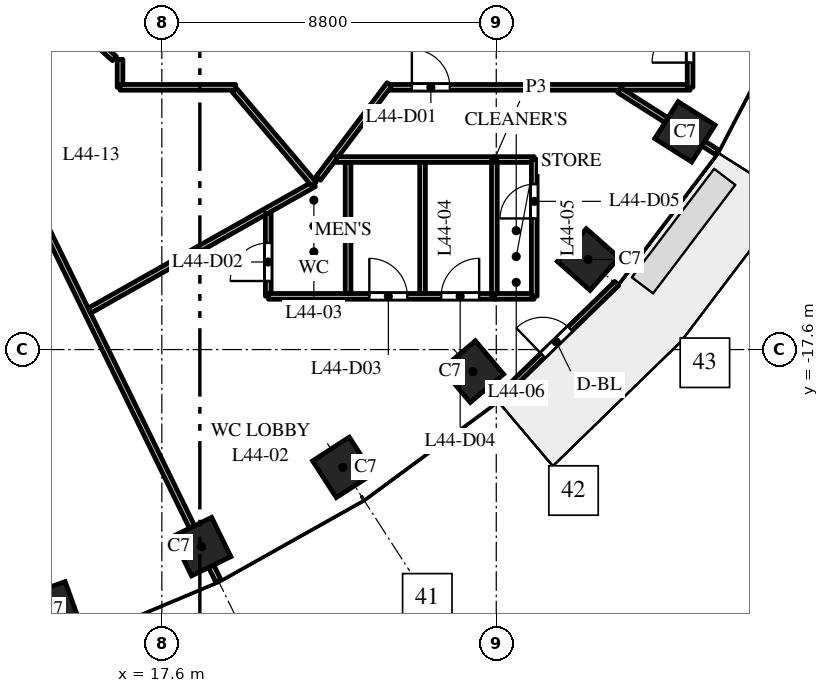
"""IFC4 building model, lengths in metres.
Left out: names, types, materials, properties, quantities, classifications, styles, units other than length and angle.
Written with IfcOpenShell. Run it as: python <this file> out.ifc"""

import sys

from ifc_helpers import new_model, si_unit, direction, frame, frame_2d, origin, origin_2d, place, context, subcontext, project, spatial, rectangle, extrude, element, fill, save


model = new_model("IFC4")
c1 = context("Model", 3, precision=1e-05, world=origin(), true_north=direction((0.0, 1.0)))
c2 = subcontext(c1, "Body", "Model", "MODEL_VIEW")
j1 = project(units=[si_unit("LENGTHUNIT", "METRE"), si_unit("PLANEANGLEUNIT", "RADIAN")], contexts=[c1])
p1 = place(None, origin())
s1 = spatial("IfcSite", under=j1, at=p1, CompositionType="ELEMENT")
p2 = place(p1, origin())
s2 = spatial("IfcBuilding", under=s1, at=p2, CompositionType="ELEMENT")
p3 = place(p2, frame((0.0, 0.0, 190.0)))
s3 = spatial("IfcBuildingStorey", under=s2, at=p3, CompositionType="ELEMENT", Elevation=190.0)
for number, where, z_axis, x_axis in (
    (1, (14.709, -24.441, 0.0), (0.0, 0.0, 1.0), (0.941, 0.338, 0.0)),
    (2, (18.646, -22.785, 0.0), (0.0, 0.0, 1.0), (0.898, 0.439, 0.0)),
    (3, (22.362, -20.7, 0.0), (0.0, 0.0, 1.0), (0.84, 0.542, 0.0)),
    (4, (25.783, -18.18, 0.0), (0.0, 0.0, 1.0), (0.763, 0.646, 0.0)),
    (5, (28.819, -15.23, 0.0), (0.0, 0.0, 1.0), (0.663, 0.749, 0.0)),
    (6, (31.365, -11.871, 0.0), (0.0, 0.0, 1.0), (0.535, 0.845, 0.0)),
):
    element("IfcColumn", number, at=place(p3, frame(where, z_axis=z_axis, x_axis=x_axis)), inside=s3, PredefinedType="COLUMN", context=c2, shape_type="SweptSolid", body=[
        extrude(rectangle(XDim=1.15, YDim=1.15, at=origin_2d()), origin(), (0.0, 0.0, 1.0), 4.0),
    ])
p4 = place(p3, frame((26.396, -18.943, 0.0), z_axis=(0.0, 0.0, 1.0), x_axis=(0.717214761864, 0.696852197647, 0.0)))
e7 = element("IfcWall", 7, at=p4, inside=s3, PredefinedType="STANDARD", context=c2, shape_type="SweptSolid", body=[
    extrude(rectangle(XDim=4.424, YDim=0.15, at=frame_2d((2.212, 0.0))), origin(), (0.0, 0.0, 1.0), 3.7),
])
p5 = place(p4, frame((1.712, 0.0, 0.0)))
e8 = element("IfcOpeningElement", 8, at=p5, cuts=e7, PredefinedType="OPENING", context=c2, shape_type="SweptSolid", body=[
    extrude(rectangle(XDim=1.0, YDim=2.4, at=frame_2d((0.5, 1.2))), frame((0.0, 0.085, 0.0), z_axis=(0.0, -1.0, 0.0), x_axis=(1.0, 0.0, 0.0)), (0.0, 0.0, 1.0), 0.17),
])
p6 = place(p3, frame((12.769, -10.765, 0.0), z_axis=(0.0, 0.0, 1.0), x_axis=(0.439230835686, -0.898374238824, 0.0)))
e9 = element("IfcWall", 9, at=p6, inside=s3, PredefinedType="PARTITIONING", context=c2, shape_type="SweptSolid", body=[
    extrude(rectangle(XDim=14.382, YDim=0.15, at=frame_2d((7.191, 0.0))), origin(), (0.0, 0.0, 1.0), 2.9),
])
p7 = place(p3, frame((15.694, -16.577, 0.0), z_axis=(0.0, 0.0, 1.0), x_axis=(0.871255216399, 0.490830263835, 0.0)))
e10 = element("IfcWall", 10, at=p7, inside=s3, PredefinedType="PARTITIONING", context=c2, shape_type="SweptSolid", body=[
    extrude(rectangle(XDim=6.782, YDim=0.15, at=frame_2d((3.391, 0.0))), origin(), (0.0, 0.0, 1.0), 3.7),
])
p8 = place(p3, frame((16.5, -10.7, 0.0), z_axis=(0.0, 0.0, 1.0), x_axis=(0.0, 1.0, 0.0)))
e11 = element("IfcWall", 11, at=p8, inside=s3, PredefinedType="PARTITIONING", context=c2, shape_type="SweptSolid", body=[
    extrude(rectangle(XDim=0.736, YDim=0.15, at=frame_2d((0.368, 0.0))), origin(), (0.0, 0.0, 1.0), 3.7),
])
p9 = place(p3, frame((16.5, -10.7, 0.0), z_axis=(0.0, 0.0, 1.0), x_axis=(1.0, 0.0, 0.0)))
e12 = element("IfcWall", 12, at=p9, inside=s3, PredefinedType="PARTITIONING", context=c2, shape_type="SweptSolid", body=[
    extrude(rectangle(XDim=3.043, YDim=0.15, at=frame_2d((1.521, 0.0))), origin(), (0.0, 0.0, 1.0), 3.7),
])
p10 = place(p3, frame((19.511, -10.778, 0.0), z_axis=(0.0, 0.0, 1.0), x_axis=(0.646314086505, -0.763071491792, 0.0)))
e13 = element("IfcWall", 13, at=p10, inside=s3, PredefinedType="PARTITIONING", context=c2, shape_type="SweptSolid", body=[
    extrude(rectangle(XDim=3.237, YDim=0.15, at=frame_2d((1.618, 0.0))), origin(), (0.0, 0.0, 1.0), 3.7),
])
p11 = place(p3, frame((20.4, -16.196, 0.0), z_axis=(0.0, 0.0, 1.0), x_axis=(0.0, 1.0, 0.0)))
e14 = element("IfcWall", 14, at=p11, inside=s3, PredefinedType="PARTITIONING", context=c2, shape_type="SweptSolid", body=[
    extrude(rectangle(XDim=2.18, YDim=0.15, at=frame_2d((1.09, 0.0))), origin(), (0.0, 0.0, 1.0), 3.7),
])
p12 = place(p11, frame((0.4, 0.0, 0.0)))
e15 = element("IfcOpeningElement", 15, at=p12, cuts=e14, PredefinedType="OPENING", context=c2, shape_type="SweptSolid", body=[
    extrude(rectangle(XDim=1.0, YDim=2.1, at=frame_2d((0.5, 1.05))), frame((0.0, 0.085, 0.0), z_axis=(0.0, -1.0, 0.0), x_axis=(1.0, 0.0, 0.0)), (0.0, 0.0, 1.0), 0.17),
])
p13 = place(p3, frame((20.404, -16.2, 0.0), z_axis=(0.0, 0.0, 1.0), x_axis=(1.0, 0.0, 0.0)))
e16 = element("IfcWall", 16, at=p13, inside=s3, PredefinedType="PARTITIONING", context=c2, shape_type="SweptSolid", body=[
    extrude(rectangle(XDim=5.946, YDim=0.15, at=frame_2d((2.973, 0.0))), origin(), (0.0, 0.0, 1.0), 3.7),
])
p14 = place(p13, frame((2.656, 0.0, 0.0)))
e17 = element("IfcOpeningElement", 17, at=p14, cuts=e16, PredefinedType="OPENING", context=c2, shape_type="SweptSolid", body=[
    extrude(rectangle(XDim=1.0, YDim=2.1, at=frame_2d((0.5, 1.05))), frame((0.0, 0.085, 0.0), z_axis=(0.0, -1.0, 0.0), x_axis=(1.0, 0.0, 0.0)), (0.0, 0.0, 1.0), 0.17),
])
p15 = place(p13, frame((4.546, 0.0, 0.0)))
e18 = element("IfcOpeningElement", 18, at=p15, cuts=e16, PredefinedType="OPENING", context=c2, shape_type="SweptSolid", body=[
    extrude(rectangle(XDim=1.0, YDim=2.1, at=frame_2d((0.5, 1.05))), frame((0.0, 0.085, 0.0), z_axis=(0.0, -1.0, 0.0), x_axis=(1.0, 0.0, 0.0)), (0.0, 0.0, 1.0), 0.17),
])
p16 = place(p3, frame((21.716, -13.098, 0.0), z_axis=(0.0, 0.0, 1.0), x_axis=(0.603132715751, 0.797640851004, 0.0)))
e19 = element("IfcWall", 19, at=p16, inside=s3, PredefinedType="PARTITIONING", context=c2, shape_type="SweptSolid", body=[
    extrude(rectangle(XDim=3.1, YDim=0.15, at=frame_2d((1.55, 0.0))), origin(), (0.0, 0.0, 1.0), 2.75),
])
p17 = place(p3, frame((22.191, -12.6, 0.0), z_axis=(0.0, 0.0, 1.0), x_axis=(1.0, 0.0, 0.0)))
e20 = element("IfcWall", 20, at=p17, inside=s3, PredefinedType="PARTITIONING", context=c2, shape_type="SweptSolid", body=[
    extrude(rectangle(XDim=4.159, YDim=0.15, at=frame_2d((2.08, 0.0))), origin(), (0.0, 0.0, 1.0), 2.75),
])
p18 = place(p3, frame((22.5, -16.125, 0.0), z_axis=(0.0, 0.0, 1.0), x_axis=(0.0, 1.0, 0.0)))
e21 = element("IfcWall", 21, at=p18, inside=s3, PredefinedType="PARTITIONING", context=c2, shape_type="SweptSolid", body=[
    extrude(rectangle(XDim=3.45, YDim=0.15, at=frame_2d((1.725, 0.0))), origin(), (0.0, 0.0, 1.0), 3.7),
])
p19 = place(p3, frame((23.623, -10.7, 0.0), z_axis=(0.0, 0.0, 1.0), x_axis=(1.0, 0.0, 0.0)))
e22 = element("IfcWall", 22, at=p19, inside=s3, PredefinedType="PARTITIONING", context=c2, shape_type="SweptSolid", body=[
    extrude(rectangle(XDim=7.877, YDim=0.15, at=frame_2d((3.938, 0.0))), origin(), (0.0, 0.0, 1.0), 2.9),
])
p20 = place(p19, frame((0.556, 0.0, 0.0)))
e23 = element("IfcOpeningElement", 23, at=p20, cuts=e22, PredefinedType="OPENING", context=c2, shape_type="SweptSolid", body=[
    extrude(rectangle(XDim=1.0, YDim=2.1, at=frame_2d((0.5, 1.05))), frame((0.0, 0.085, 0.0), z_axis=(0.0, -1.0, 0.0), x_axis=(1.0, 0.0, 0.0)), (0.0, 0.0, 1.0), 0.17),
])
p21 = place(p3, frame((24.46, -16.125, 0.0), z_axis=(0.0, 0.0, 1.0), x_axis=(0.0, 1.0, 0.0)))
e24 = element("IfcWall", 24, at=p21, inside=s3, PredefinedType="PARTITIONING", context=c2, shape_type="SweptSolid", body=[
    extrude(rectangle(XDim=3.45, YDim=0.15, at=frame_2d((1.725, 0.0))), origin(), (0.0, 0.0, 1.0), 2.75),
])
p22 = place(p3, frame((26.35, -16.2, 0.0), z_axis=(0.0, 0.0, 1.0), x_axis=(0.0, 1.0, 0.0)))
e25 = element("IfcWall", 25, at=p22, inside=s3, PredefinedType="PARTITIONING", context=c2, shape_type="SweptSolid", body=[
    extrude(rectangle(XDim=3.6, YDim=0.15, at=frame_2d((1.8, 0.0))), origin(), (0.0, 0.0, 1.0), 2.75),
])
p23 = place(p3, frame((26.35, -16.2, 0.0), z_axis=(0.0, 0.0, 1.0), x_axis=(1.0, 0.0, 0.0)))
e26 = element("IfcWall", 26, at=p23, inside=s3, PredefinedType="PARTITIONING", context=c2, shape_type="SweptSolid", body=[
    extrude(rectangle(XDim=1.046, YDim=0.15, at=frame_2d((0.523, 0.0))), origin(), (0.0, 0.0, 1.0), 2.9),
])
p24 = place(p3, frame((26.35, -12.6, 0.0), z_axis=(0.0, 0.0, 1.0), x_axis=(1.0, 0.0, 0.0)))
e27 = element("IfcWall", 27, at=p24, inside=s3, PredefinedType="PARTITIONING", context=c2, shape_type="SweptSolid", body=[
    extrude(rectangle(XDim=1.05, YDim=0.15, at=frame_2d((0.525, 0.0))), origin(), (0.0, 0.0, 1.0), 3.7),
])
p25 = place(p3, frame((27.4, -16.196, 0.0), z_axis=(0.0, 0.0, 1.0), x_axis=(0.0, 1.0, 0.0)))
e28 = element("IfcWall", 28, at=p25, inside=s3, PredefinedType="PARTITIONING", context=c2, shape_type="SweptSolid", body=[
    extrude(rectangle(XDim=3.596, YDim=0.15, at=frame_2d((1.798, 0.0))), origin(), (0.0, 0.0, 1.0), 2.75),
])
p26 = place(p25, frame((2.046, 0.0, 0.0)))
e29 = element("IfcOpeningElement", 29, at=p26, cuts=e28, PredefinedType="OPENING", context=c2, shape_type="SweptSolid", body=[
    extrude(rectangle(XDim=0.9, YDim=2.1, at=frame_2d((0.45, 1.05))), frame((0.0, 0.085, 0.0), z_axis=(0.0, -1.0, 0.0), x_axis=(1.0, 0.0, 0.0)), (0.0, 0.0, 1.0), 0.17),
])
p27 = place(p3, frame((29.637, -10.777, 0.0), z_axis=(0.0, 0.0, 1.0), x_axis=(0.844810627195, -0.535065420467, 0.0)))
e30 = element("IfcWall", 30, at=p27, inside=s3, PredefinedType="PARTITIONING", context=c2, shape_type="SweptSolid", body=[
    extrude(rectangle(XDim=3.048, YDim=0.15, at=frame_2d((1.524, 0.0))), origin(), (0.0, 0.0, 1.0), 2.9),
])
p28 = place(p3, frame((31.5, -10.7, 0.0), z_axis=(0.0, 0.0, 1.0), x_axis=(0.0, 1.0, 0.0)))
e31 = element("IfcWall", 31, at=p28, inside=s3, PredefinedType="PARTITIONING", context=c2, shape_type="SweptSolid", body=[
    extrude(rectangle(XDim=2.2, YDim=0.15, at=frame_2d((1.1, 0.0))), origin(), (0.0, 0.0, 1.0), 2.9),
])
p29 = place(p28, frame((0.65, 0.0, 0.0)))
e32 = element("IfcOpeningElement", 32, at=p29, cuts=e31, PredefinedType="OPENING", context=c2, shape_type="SweptSolid", body=[
    extrude(rectangle(XDim=1.0, YDim=2.1, at=frame_2d((0.5, 1.05))), frame((0.0, 0.085, 0.0), z_axis=(0.0, -1.0, 0.0), x_axis=(1.0, 0.0, 0.0)), (0.0, 0.0, 1.0), 0.17),
])
p30 = place(p3, frame((16.352, -9.942, 0.0), z_axis=(0.0, 0.0, 1.0), x_axis=(-0.744832366149, 0.667251636444, 0.0)))
e33 = element("IfcWall", 33, at=p30, inside=s3, PredefinedType="PARTITIONING", context=c2, shape_type="SweptSolid", body=[
    extrude(rectangle(XDim=1.702, YDim=0.15, at=frame_2d((0.851, 0.0))), origin(), (0.0, 0.0, 1.0), 3.7),
])
p31 = place(p5, origin())
e34 = element("IfcDoor", 34, at=p31, inside=s3, OperationType="SINGLE_SWING_LEFT", PredefinedType="DOOR", context=c2, shape_type="SweptSolid", body=[
    extrude(rectangle(XDim=1.0, YDim=2.4, at=frame_2d((0.5, 1.2))), frame((0.0, 0.025, 0.0), z_axis=(0.0, -1.0, 0.0), x_axis=(1.0, 0.0, 0.0)), (0.0, 0.0, 1.0), 0.05),
])
fill(e8, e34)
p32 = place(p20, origin())
e35 = element("IfcDoor", 35, at=p32, inside=s3, OperationType="SINGLE_SWING_LEFT", PredefinedType="DOOR", context=c2, shape_type="SweptSolid", body=[
    extrude(rectangle(XDim=1.0, YDim=2.1, at=frame_2d((0.5, 1.05))), frame((0.0, 0.025, 0.0), z_axis=(0.0, -1.0, 0.0), x_axis=(1.0, 0.0, 0.0)), (0.0, 0.0, 1.0), 0.05),
])
fill(e23, e35)
p33 = place(p12, origin())
e36 = element("IfcDoor", 36, at=p33, inside=s3, OperationType="SINGLE_SWING_LEFT", PredefinedType="DOOR", context=c2, shape_type="SweptSolid", body=[
    extrude(rectangle(XDim=1.0, YDim=2.1, at=frame_2d((0.5, 1.05))), frame((0.0, 0.025, 0.0), z_axis=(0.0, -1.0, 0.0), x_axis=(1.0, 0.0, 0.0)), (0.0, 0.0, 1.0), 0.05),
])
fill(e15, e36)
p34 = place(p14, origin())
e37 = element("IfcDoor", 37, at=p34, inside=s3, OperationType="SINGLE_SWING_LEFT", PredefinedType="DOOR", context=c2, shape_type="SweptSolid", body=[
    extrude(rectangle(XDim=1.0, YDim=2.1, at=frame_2d((0.5, 1.05))), frame((0.0, 0.025, 0.0), z_axis=(0.0, -1.0, 0.0), x_axis=(1.0, 0.0, 0.0)), (0.0, 0.0, 1.0), 0.05),
])
fill(e17, e37)
p35 = place(p15, origin())
e38 = element("IfcDoor", 38, at=p35, inside=s3, OperationType="SINGLE_SWING_RIGHT", PredefinedType="DOOR", context=c2, shape_type="SweptSolid", body=[
    extrude(rectangle(XDim=1.0, YDim=2.1, at=frame_2d((0.5, 1.05))), frame((0.0, 0.025, 0.0), z_axis=(0.0, -1.0, 0.0), x_axis=(1.0, 0.0, 0.0)), (0.0, 0.0, 1.0), 0.05),
])
fill(e18, e38)
p36 = place(p26, origin())
e39 = element("IfcDoor", 39, at=p36, inside=s3, OperationType="SINGLE_SWING_LEFT", PredefinedType="DOOR", context=c2, shape_type="SweptSolid", body=[
    extrude(rectangle(XDim=0.9, YDim=2.1, at=frame_2d((0.45, 1.05))), frame((0.0, 0.025, 0.0), z_axis=(0.0, -1.0, 0.0), x_axis=(1.0, 0.0, 0.0)), (0.0, 0.0, 1.0), 0.05),
])
fill(e29, e39)
p37 = place(p29, origin())
e40 = element("IfcDoor", 40, at=p37, inside=s3, OperationType="SINGLE_SWING_LEFT", PredefinedType="DOOR", context=c2, shape_type="SweptSolid", body=[
    extrude(rectangle(XDim=1.0, YDim=2.1, at=frame_2d((0.5, 1.05))), frame((0.0, 0.025, 0.0), z_axis=(0.0, -1.0, 0.0), x_axis=(1.0, 0.0, 0.0)), (0.0, 0.0, 1.0), 0.05),
])
fill(e32, e40)
save(model, sys.argv[1])
